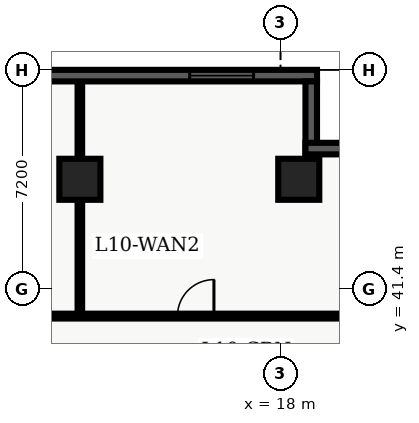
"""IFC4 building model, lengths in metres.
Left out: names, types, materials, properties, quantities, classifications, styles, units other than length and angle.
Written with IfcOpenShell. Run it as: python <this file> out.ifc"""

import sys

from ifc_helpers import new_model, entity, si_unit, converted_unit, direction, frame, origin_with_axes, origin_2d_with_axis, place, context, subcontext, project, spatial, polyline, rectangle, outline, extrude, element, fill, save


model = new_model("IFC4")
c1 = context("Model", 3, precision=1e-05, world=origin_with_axes(), true_north=direction((0.0, 1.0)))
c2 = subcontext(c1, "Body", "Model", "MODEL_VIEW")
j1 = project(units=[si_unit("LENGTHUNIT", "METRE"), converted_unit("PLANEANGLEUNIT", "DEGREE", entity("IfcPlaneAngleMeasure", 0.017), si_unit("PLANEANGLEUNIT", "RADIAN"), dimensions=[0, 0, 0, 0, 0, 0, 0])], contexts=[c1])
p1 = place(None, origin_with_axes())
s1 = spatial("IfcSite", under=j1, at=p1, CompositionType="ELEMENT")
p2 = place(p1, origin_with_axes())
s2 = spatial("IfcBuilding", under=s1, at=p2, CompositionType="ELEMENT")
p3 = place(p2, frame((0.0, 0.0, 44.4), z_axis=(0.0, 0.0, 1.0), x_axis=(1.0, 0.0, 0.0)))
s3 = spatial("IfcBuildingStorey", under=s2, at=p3, CompositionType="ELEMENT", Elevation=44.4)
for number, where, z_axis, x_axis in (
    (1, (11.4, 45.0, 0.0), (0.0, 0.0, 1.0), (1.0, 0.0, 0.0)),
    (2, (18.6, 45.0, 0.0), (0.0, 0.0, 1.0), (1.0, 0.0, 0.0)),
):
    element("IfcColumn", number, at=place(p3, frame(where, z_axis=z_axis, x_axis=x_axis)), inside=s3, PredefinedType="COLUMN", context=c2, shape_type="SweptSolid", body=[
        extrude(rectangle(XDim=1.35, YDim=1.35, at=origin_2d_with_axis()), origin_with_axes(), (0.0, 0.0, 1.0), 3.9),
    ])
p4 = place(p3, frame((2.6, 40.5, 0.0), z_axis=(0.0, 0.0, 1.0), x_axis=(1.0, 0.0, 0.0)))
e3 = element("IfcWall", 3, at=p4, inside=s3, PredefinedType="PARTITIONING", context=c2, shape_type="SweptSolid", body=[
    extrude(outline(polyline([(0.0, -0.08), (18.65, -0.08), (18.65, 0.08), (0.0, 0.08), (0.0, -0.08)])), origin_with_axes(), (0.0, 0.0, 1.0), 2.7),
])
p5 = place(p4, frame((5.275, 0.0, 0.0), z_axis=(0.0, 0.0, 1.0), x_axis=(1.0, 0.0, 0.0)))
e4 = element("IfcOpeningElement", 4, at=p5, cuts=e3, PredefinedType="OPENING", context=c2, shape_type="SweptSolid", body=[
    extrude(rectangle(XDim=1.0, YDim=0.18, at=origin_2d_with_axis()), origin_with_axes(), (0.0, 0.0, 1.0), 2.15),
])
p6 = place(p4, frame((12.61, 0.0, 0.0), z_axis=(0.0, 0.0, 1.0), x_axis=(1.0, 0.0, 0.0)))
e5 = element("IfcOpeningElement", 5, at=p6, cuts=e3, PredefinedType="OPENING", context=c2, shape_type="SweptSolid", body=[
    extrude(rectangle(XDim=1.2, YDim=0.18, at=origin_2d_with_axis()), origin_with_axes(), (0.0, 0.0, 1.0), 2.2),
])
p7 = place(p3, frame((11.4, 40.6, 0.0), z_axis=(0.0, 0.0, 1.0), x_axis=(0.0, 1.0, 0.0)))
e6 = element("IfcWall", 6, at=p7, inside=s3, PredefinedType="PARTITIONING", context=c2, shape_type="SweptSolid", body=[
    extrude(outline(polyline([(0.0, -0.075), (7.64, -0.075), (7.64, 0.075), (0.0, 0.075), (0.0, -0.075)])), origin_with_axes(), (0.0, 0.0, 1.0), 2.7),
])
p8 = place(p3, frame((2.78, 48.41, 0.0), z_axis=(0.0, 0.0, 1.0), x_axis=(1.0, 0.0, 0.0)))
e7 = element("IfcWall", 7, at=p8, inside=s3, PredefinedType="SOLIDWALL", context=c2, shape_type="SweptSolid", body=[
    extrude(outline(polyline([(0.0, -0.19), (16.42, -0.19), (16.42, 0.19), (0.0, 0.19), (0.0, -0.19)])), origin_with_axes(), (0.0, 0.0, 1.0), 3.66),
])
p9 = place(p8, frame((3.137, 0.0, 0.45), z_axis=(0.0, 0.0, 1.0), x_axis=(1.0, 0.0, 0.0)))
e8 = element("IfcOpeningElement", 8, at=p9, cuts=e7, PredefinedType="OPENING", context=c2, shape_type="SweptSolid", body=[
    extrude(rectangle(XDim=2.1, YDim=0.4, at=origin_2d_with_axis()), origin_with_axes(), (0.0, 0.0, 1.0), 2.2),
])
p10 = place(p8, frame((13.283, 0.0, 0.45), z_axis=(0.0, 0.0, 1.0), x_axis=(1.0, 0.0, 0.0)))
e9 = element("IfcOpeningElement", 9, at=p10, cuts=e7, PredefinedType="OPENING", context=c2, shape_type="SweptSolid", body=[
    extrude(rectangle(XDim=2.1, YDim=0.4, at=origin_2d_with_axis()), origin_with_axes(), (0.0, 0.0, 1.0), 2.2),
])
p11 = place(p3, frame((19.01, 48.22, 0.0), z_axis=(0.0, 0.0, 1.0), x_axis=(0.0, -1.0, 0.0)))
e10 = element("IfcWall", 10, at=p11, inside=s3, PredefinedType="SOLIDWALL", context=c2, shape_type="SweptSolid", body=[
    extrude(outline(polyline([(0.0, -0.19), (2.56, -0.19), (2.56, 0.19), (0.0, 0.19), (0.0, -0.19)])), origin_with_axes(), (0.0, 0.0, 1.0), 3.66),
])
p12 = place(p3, frame((18.82, 46.01, 0.0), z_axis=(0.0, 0.0, 1.0), x_axis=(1.0, 0.0, 0.0)))
e11 = element("IfcWall", 11, at=p12, inside=s3, PredefinedType="SOLIDWALL", context=c2, shape_type="SweptSolid", body=[
    extrude(outline(polyline([(0.0, -0.19), (2.78, -0.19), (2.78, 0.19), (0.0, 0.19), (0.0, -0.19)])), origin_with_axes(), (0.0, 0.0, 1.0), 3.66),
])
p13 = place(p4, frame((12.61, 0.0, 0.0), z_axis=(0.0, 0.0, 1.0), x_axis=(1.0, 0.0, 0.0)))
e12 = element("IfcDoor", 12, at=p13, inside=s3, OperationType="SINGLE_SWING_RIGHT", PredefinedType="DOOR", context=c2, shape_type="SweptSolid", body=[
    extrude(rectangle(XDim=1.2, YDim=0.09, at=origin_2d_with_axis()), origin_with_axes(), (0.0, 0.0, 1.0), 2.2),
])
fill(e5, e12)
p14 = place(p8, frame((13.283, 0.0, 0.45), z_axis=(0.0, 0.0, 1.0), x_axis=(1.0, 0.0, 0.0)))
e13 = element("IfcWindow", 13, at=p14, inside=s3, PredefinedType="WINDOW", context=c2, shape_type="SweptSolid", body=[
    extrude(rectangle(XDim=2.1, YDim=0.09, at=origin_2d_with_axis()), origin_with_axes(), (0.0, 0.0, 1.0), 2.2),
])
fill(e9, e13)
save(model, sys.argv[1])
